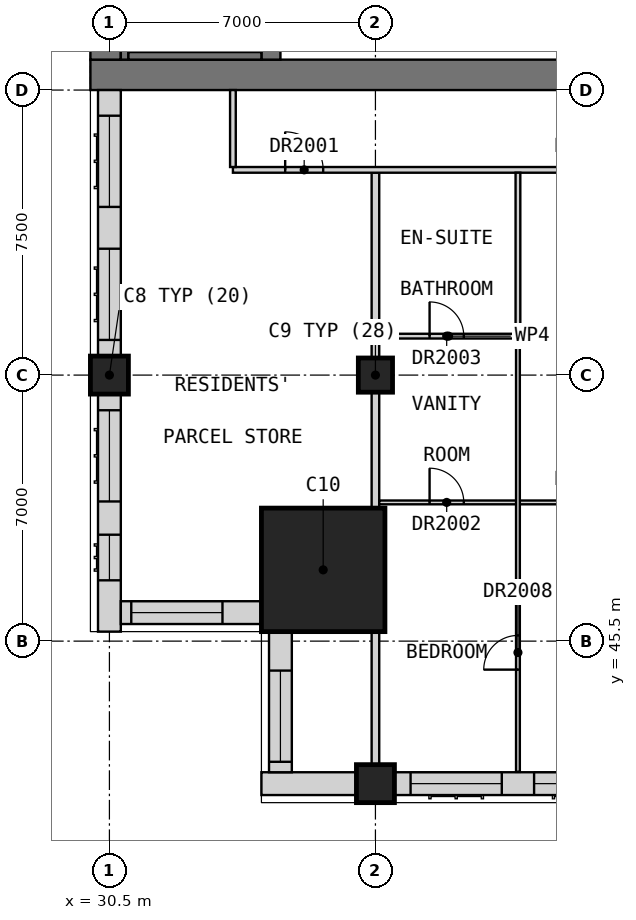
"""IFC4 building model, lengths in metres.
Left out: names, types, materials, properties, quantities, classifications, styles, units other than length and angle.
Written with IfcOpenShell. Run it as: python <this file> out.ifc"""

import sys

from ifc_helpers import new_model, si_unit, direction, frame, frame_2d, origin, origin_2d, place, context, subcontext, project, spatial, rectangle, extrude, element, fill, save


model = new_model("IFC4")
c1 = context("Model", 3, precision=1e-05, world=origin(), true_north=direction((0.0, 1.0)))
c2 = subcontext(c1, "Body", "Model", "MODEL_VIEW")
j1 = project(units=[si_unit("LENGTHUNIT", "METRE"), si_unit("PLANEANGLEUNIT", "RADIAN")], contexts=[c1])
p1 = place(None, origin())
s1 = spatial("IfcSite", under=j1, at=p1, CompositionType="ELEMENT")
p2 = place(p1, origin())
s2 = spatial("IfcBuilding", under=s1, at=p2, CompositionType="ELEMENT")
p3 = place(p2, frame((0.0, 0.0, 182.7)))
s3 = spatial("IfcBuildingStorey", under=s2, at=p3, CompositionType="ELEMENT", Elevation=182.7)
for number, where, z_axis, x_axis in (
    (1, (37.5, 41.75, 0.0), (0.0, 0.0, 1.0), (1.0, 0.0, 0.0)),
    (2, (30.5, 52.5, 0.0), (0.0, 0.0, 1.0), (1.0, 0.0, 0.0)),
):
    element("IfcColumn", number, at=place(p3, frame(where, z_axis=z_axis, x_axis=x_axis)), inside=s3, PredefinedType="COLUMN", context=c2, shape_type="SweptSolid", body=[
        extrude(rectangle(XDim=1.0, YDim=1.0, at=origin_2d()), origin(), (0.0, 0.0, 1.0), 3.5),
    ])
p4 = place(p3, frame((37.5, 52.5, 0.0), z_axis=(0.0, 0.0, 1.0), x_axis=(1.0, 0.0, 0.0)))
e3 = element("IfcColumn", 3, at=p4, inside=s3, PredefinedType="COLUMN", context=c2, shape_type="SweptSolid", body=[
    extrude(rectangle(XDim=0.9, YDim=0.9, at=origin_2d()), origin(), (0.0, 0.0, 1.0), 3.5),
])
p5 = place(p3, frame((36.125, 47.375, 0.0), z_axis=(0.0, 0.0, 1.0), x_axis=(1.0, 0.0, 0.0)))
e4 = element("IfcColumn", 4, at=p5, inside=s3, PredefinedType="COLUMN", context=c2, shape_type="SweptSolid", body=[
    extrude(rectangle(XDim=3.25, YDim=3.25, at=origin_2d()), origin(), (0.0, 0.0, 1.0), 3.5),
])
p6 = place(p3, frame((30.0, 60.4, 0.0), z_axis=(0.0, 0.0, 1.0), x_axis=(1.0, 0.0, 0.0)))
e5 = element("IfcWall", 5, at=p6, inside=s3, PredefinedType="SHEAR", context=c2, shape_type="SweptSolid", body=[
    extrude(rectangle(XDim=30.0, YDim=0.8, at=frame_2d((15.0, 0.0))), origin(), (0.0, 0.0, 1.0), 3.5),
])
p7 = place(p6, frame((21.9, 0.0, 0.0)))
e6 = element("IfcOpeningElement", 6, at=p7, cuts=e5, PredefinedType="OPENING", context=c2, shape_type="SweptSolid", body=[
    extrude(rectangle(XDim=1.8, YDim=2.1, at=frame_2d((0.9, 1.05))), frame((0.0, 0.41, 0.0), z_axis=(0.0, -1.0, 0.0), x_axis=(1.0, 0.0, 0.0)), (0.0, 0.0, 1.0), 0.82),
])
p8 = place(p6, frame((26.5, 0.0, 0.0)))
e7 = element("IfcOpeningElement", 7, at=p8, cuts=e5, PredefinedType="OPENING", context=c2, shape_type="SweptSolid", body=[
    extrude(rectangle(XDim=1.2, YDim=2.1, at=frame_2d((0.6, 1.05))), frame((0.0, 0.41, 0.0), z_axis=(0.0, -1.0, 0.0), x_axis=(1.0, 0.0, 0.0)), (0.0, 0.0, 1.0), 0.82),
])
p9 = place(p3, frame((30.4, 60.8, 0.0), z_axis=(0.0, 0.0, 1.0), x_axis=(0.0, 1.0, 0.0)))
e8 = element("IfcWall", 8, at=p9, inside=s3, PredefinedType="SHEAR", context=c2, shape_type="SweptSolid", body=[
    extrude(rectangle(XDim=20.9, YDim=0.8, at=frame_2d((10.45, 0.0))), origin(), (0.0, 0.0, 1.0), 3.5),
])
p10 = place(p3, frame((34.75, 60.8, 0.0), z_axis=(0.0, 0.0, 1.0), x_axis=(0.0, 1.0, 0.0)))
e9 = element("IfcWall", 9, at=p10, inside=s3, PredefinedType="SHEAR", context=c2, shape_type="SweptSolid", body=[
    extrude(rectangle(XDim=3.4, YDim=0.5, at=frame_2d((1.7, 0.0))), origin(), (0.0, 0.0, 1.0), 3.5),
])
p11 = place(p3, frame((34.5, 41.75, 0.0), z_axis=(0.0, 0.0, 1.0), x_axis=(1.0, 0.0, 0.0)))
e10 = element("IfcWall", 10, at=p11, inside=s3, PredefinedType="SOLIDWALL", context=c2, shape_type="SweptSolid", body=[
    extrude(rectangle(XDim=2.5, YDim=0.6, at=frame_2d((1.25, 0.0))), origin(), (0.0, 0.0, 1.0), 3.25),
])
p12 = place(p3, frame((38.0, 41.75, 0.0), z_axis=(0.0, 0.0, 1.0), x_axis=(1.0, 0.0, 0.0)))
e11 = element("IfcWall", 11, at=p12, inside=s3, PredefinedType="SOLIDWALL", context=c2, shape_type="SweptSolid", body=[
    extrude(rectangle(XDim=6.5, YDim=0.6, at=frame_2d((3.25, 0.0))), origin(), (0.0, 0.0, 1.0), 2.75),
])
p13 = place(p12, frame((0.425, 0.0, 0.8)))
e12 = element("IfcOpeningElement", 12, at=p13, cuts=e11, PredefinedType="OPENING", context=c2, shape_type="SweptSolid", body=[
    extrude(rectangle(XDim=2.4, YDim=1.8, at=frame_2d((1.2, 0.9))), frame((0.0, 0.31, 0.0), z_axis=(0.0, -1.0, 0.0), x_axis=(1.0, 0.0, 0.0)), (0.0, 0.0, 1.0), 0.62),
])
p14 = place(p12, frame((3.675, 0.0, 0.8)))
e13 = element("IfcOpeningElement", 13, at=p14, cuts=e11, PredefinedType="OPENING", context=c2, shape_type="SweptSolid", body=[
    extrude(rectangle(XDim=2.4, YDim=1.8, at=frame_2d((1.2, 0.9))), frame((0.0, 0.31, 0.0), z_axis=(0.0, -1.0, 0.0), x_axis=(1.0, 0.0, 0.0)), (0.0, 0.0, 1.0), 0.62),
])
p15 = place(p3, frame((30.5, 60.0, 0.0), z_axis=(0.0, 0.0, 1.0), x_axis=(0.0, -1.0, 0.0)))
e14 = element("IfcWall", 14, at=p15, inside=s3, PredefinedType="SOLIDWALL", context=c2, shape_type="SweptSolid", body=[
    extrude(rectangle(XDim=7.0, YDim=0.6, at=frame_2d((3.5, 0.0))), origin(), (0.0, 0.0, 1.0), 3.25),
])
p16 = place(p15, frame((4.175, 0.0, 0.8)))
e15 = element("IfcOpeningElement", 15, at=p16, cuts=e14, PredefinedType="OPENING", context=c2, shape_type="SweptSolid", body=[
    extrude(rectangle(XDim=2.4, YDim=1.8, at=frame_2d((1.2, 0.9))), frame((0.0, 0.31, 0.0), z_axis=(0.0, -1.0, 0.0), x_axis=(1.0, 0.0, 0.0)), (0.0, 0.0, 1.0), 0.62),
])
p17 = place(p15, frame((0.675, 0.0, 0.8)))
e16 = element("IfcOpeningElement", 16, at=p17, cuts=e14, PredefinedType="OPENING", context=c2, shape_type="SweptSolid", body=[
    extrude(rectangle(XDim=2.4, YDim=1.8, at=frame_2d((1.2, 0.9))), frame((0.0, 0.31, 0.0), z_axis=(0.0, -1.0, 0.0), x_axis=(1.0, 0.0, 0.0)), (0.0, 0.0, 1.0), 0.62),
])
p18 = place(p3, frame((30.5, 52.0, 0.0), z_axis=(0.0, 0.0, 1.0), x_axis=(0.0, -1.0, 0.0)))
e17 = element("IfcWall", 17, at=p18, inside=s3, PredefinedType="SOLIDWALL", context=c2, shape_type="SweptSolid", body=[
    extrude(rectangle(XDim=6.25, YDim=0.6, at=frame_2d((3.125, 0.0))), origin(), (0.0, 0.0, 1.0), 2.75),
])
p19 = place(p18, frame((3.7, 0.0, 0.8)))
e18 = element("IfcOpeningElement", 18, at=p19, cuts=e17, PredefinedType="OPENING", context=c2, shape_type="SweptSolid", body=[
    extrude(rectangle(XDim=1.2, YDim=1.8, at=frame_2d((0.6, 0.9))), frame((0.0, 0.31, 0.0), z_axis=(0.0, -1.0, 0.0), x_axis=(1.0, 0.0, 0.0)), (0.0, 0.0, 1.0), 0.62),
])
p20 = place(p18, frame((0.425, 0.0, 0.8)))
e19 = element("IfcOpeningElement", 19, at=p20, cuts=e17, PredefinedType="OPENING", context=c2, shape_type="SweptSolid", body=[
    extrude(rectangle(XDim=2.4, YDim=1.8, at=frame_2d((1.2, 0.9))), frame((0.0, 0.31, 0.0), z_axis=(0.0, -1.0, 0.0), x_axis=(1.0, 0.0, 0.0)), (0.0, 0.0, 1.0), 0.62),
])
p21 = place(p3, frame((30.8, 46.25, 0.0), z_axis=(0.0, 0.0, 1.0), x_axis=(1.0, 0.0, 0.0)))
e20 = element("IfcWall", 20, at=p21, inside=s3, PredefinedType="SOLIDWALL", context=c2, shape_type="SweptSolid", body=[
    extrude(rectangle(XDim=3.7, YDim=0.6, at=frame_2d((1.85, 0.0))), origin(), (0.0, 0.0, 1.0), 3.25),
])
p22 = place(p21, frame((0.275, 0.0, 0.8)))
e21 = element("IfcOpeningElement", 21, at=p22, cuts=e20, PredefinedType="OPENING", context=c2, shape_type="SweptSolid", body=[
    extrude(rectangle(XDim=2.4, YDim=1.8, at=frame_2d((1.2, 0.9))), frame((0.0, 0.31, 0.0), z_axis=(0.0, -1.0, 0.0), x_axis=(1.0, 0.0, 0.0)), (0.0, 0.0, 1.0), 0.62),
])
p23 = place(p3, frame((35.0, 45.75, 0.0), z_axis=(0.0, 0.0, 1.0), x_axis=(0.0, -1.0, 0.0)))
e22 = element("IfcWall", 22, at=p23, inside=s3, PredefinedType="SOLIDWALL", context=c2, shape_type="SweptSolid", body=[
    extrude(rectangle(XDim=3.7, YDim=0.6, at=frame_2d((1.85, 0.0))), origin(), (0.0, 0.0, 1.0), 3.25),
])
p24 = place(p23, frame((1.025, 0.0, 0.8)))
e23 = element("IfcOpeningElement", 23, at=p24, cuts=e22, PredefinedType="OPENING", context=c2, shape_type="SweptSolid", body=[
    extrude(rectangle(XDim=2.4, YDim=1.8, at=frame_2d((1.2, 0.9))), frame((0.0, 0.31, 0.0), z_axis=(0.0, -1.0, 0.0), x_axis=(1.0, 0.0, 0.0)), (0.0, 0.0, 1.0), 0.62),
])
p25 = place(p3, frame((30.9, 60.8, 0.0), z_axis=(0.0, 0.0, 1.0), x_axis=(0.0, 1.0, 0.0)))
e24 = element("IfcWall", 24, at=p25, inside=s3, PredefinedType="SOLIDWALL", context=c2, shape_type="SweptSolid", body=[
    extrude(rectangle(XDim=20.9, YDim=0.2, at=frame_2d((10.45, 0.0))), origin(), (0.0, 0.0, 1.0), 3.25),
])
p26 = place(p3, frame((31.0, 60.9, 0.0), z_axis=(0.0, 0.0, 1.0), x_axis=(1.0, 0.0, 0.0)))
e25 = element("IfcWall", 25, at=p26, inside=s3, PredefinedType="SOLIDWALL", context=c2, shape_type="SweptSolid", body=[
    extrude(rectangle(XDim=3.5, YDim=0.2, at=frame_2d((1.75, 0.0))), origin(), (0.0, 0.0, 1.0), 3.25),
])
p27 = place(p3, frame((37.5, 41.25, 0.0), z_axis=(0.0, 0.0, 1.0), x_axis=(0.0, 1.0, 0.0)))
e26 = element("IfcWall", 26, at=p27, inside=s3, PredefinedType="PARTITIONING", context=c2, shape_type="SweptSolid", body=[
    extrude(rectangle(XDim=16.575, YDim=0.2, at=frame_2d((8.288, 0.0))), origin(), (0.0, 0.0, 1.0), 2.75),
])
p28 = place(p3, frame((33.75, 57.9, 0.0), z_axis=(0.0, 0.0, 1.0), x_axis=(1.0, 0.0, 0.0)))
e27 = element("IfcWall", 27, at=p28, inside=s3, PredefinedType="PARTITIONING", context=c2, shape_type="SweptSolid", body=[
    extrude(rectangle(XDim=28.35, YDim=0.15, at=frame_2d((14.175, 0.0))), origin(), (0.0, 0.0, 1.0), 3.25),
])
p29 = place(p28, frame((1.375, 0.0, 0.0)))
e28 = element("IfcOpeningElement", 28, at=p29, cuts=e27, PredefinedType="OPENING", context=c2, shape_type="SweptSolid", body=[
    extrude(rectangle(XDim=1.0, YDim=2.1, at=frame_2d((0.5, 1.05))), frame((0.0, 0.085, 0.0), z_axis=(0.0, -1.0, 0.0), x_axis=(1.0, 0.0, 0.0)), (0.0, 0.0, 1.0), 0.17),
])
p30 = place(p28, frame((8.925, 0.0, 0.0)))
e29 = element("IfcOpeningElement", 29, at=p30, cuts=e27, PredefinedType="OPENING", context=c2, shape_type="SweptSolid", body=[
    extrude(rectangle(XDim=0.9, YDim=2.1, at=frame_2d((0.45, 1.05))), frame((0.0, 0.085, 0.0), z_axis=(0.0, -1.0, 0.0), x_axis=(1.0, 0.0, 0.0)), (0.0, 0.0, 1.0), 0.17),
])
p31 = place(p28, frame((20.175, 0.0, 0.0)))
e30 = element("IfcOpeningElement", 30, at=p31, cuts=e27, PredefinedType="OPENING", context=c2, shape_type="SweptSolid", body=[
    extrude(rectangle(XDim=0.9, YDim=2.1, at=frame_2d((0.45, 1.05))), frame((0.0, 0.085, 0.0), z_axis=(0.0, -1.0, 0.0), x_axis=(1.0, 0.0, 0.0)), (0.0, 0.0, 1.0), 0.17),
])
p32 = place(p28, frame((26.8, 0.0, 0.0)))
e31 = element("IfcOpeningElement", 31, at=p32, cuts=e27, PredefinedType="OPENING", context=c2, shape_type="SweptSolid", body=[
    extrude(rectangle(XDim=1.0, YDim=2.1, at=frame_2d((0.5, 1.05))), frame((0.0, 0.085, 0.0), z_axis=(0.0, -1.0, 0.0), x_axis=(1.0, 0.0, 0.0)), (0.0, 0.0, 1.0), 0.17),
])
p33 = place(p3, frame((33.75, 57.975, 0.0), z_axis=(0.0, 0.0, 1.0), x_axis=(0.0, 1.0, 0.0)))
e32 = element("IfcWall", 32, at=p33, inside=s3, PredefinedType="PARTITIONING", context=c2, shape_type="SweptSolid", body=[
    extrude(rectangle(XDim=2.025, YDim=0.15, at=frame_2d((1.012, 0.0))), origin(), (0.0, 0.0, 1.0), 3.25),
])
p34 = place(p3, frame((37.6, 49.15, 0.0), z_axis=(0.0, 0.0, 1.0), x_axis=(1.0, 0.0, 0.0)))
e33 = element("IfcWall", 33, at=p34, inside=s3, PredefinedType="PARTITIONING", context=c2, shape_type="SweptSolid", body=[
    extrude(rectangle(XDim=22.3, YDim=0.1, at=frame_2d((11.15, 0.0))), origin(), (0.0, 0.0, 1.0), 3.25),
])
p35 = place(p34, frame((1.325, 0.0, 0.0)))
e34 = element("IfcOpeningElement", 34, at=p35, cuts=e33, PredefinedType="OPENING", context=c2, shape_type="SweptSolid", body=[
    extrude(rectangle(XDim=0.9, YDim=2.1, at=frame_2d((0.45, 1.05))), frame((0.0, 0.06, 0.0), z_axis=(0.0, -1.0, 0.0), x_axis=(1.0, 0.0, 0.0)), (0.0, 0.0, 1.0), 0.12),
])
p36 = place(p34, frame((5.075, 0.0, 0.0)))
e35 = element("IfcOpeningElement", 35, at=p36, cuts=e33, PredefinedType="OPENING", context=c2, shape_type="SweptSolid", body=[
    extrude(rectangle(XDim=0.9, YDim=2.1, at=frame_2d((0.45, 1.05))), frame((0.0, 0.06, 0.0), z_axis=(0.0, -1.0, 0.0), x_axis=(1.0, 0.0, 0.0)), (0.0, 0.0, 1.0), 0.12),
])
p37 = place(p34, frame((12.575, 0.0, 0.0)))
e36 = element("IfcOpeningElement", 36, at=p37, cuts=e33, PredefinedType="OPENING", context=c2, shape_type="SweptSolid", body=[
    extrude(rectangle(XDim=0.9, YDim=2.1, at=frame_2d((0.45, 1.05))), frame((0.0, 0.06, 0.0), z_axis=(0.0, -1.0, 0.0), x_axis=(1.0, 0.0, 0.0)), (0.0, 0.0, 1.0), 0.12),
])
p38 = place(p34, frame((16.325, 0.0, 0.0)))
e37 = element("IfcOpeningElement", 37, at=p38, cuts=e33, PredefinedType="OPENING", context=c2, shape_type="SweptSolid", body=[
    extrude(rectangle(XDim=0.9, YDim=2.1, at=frame_2d((0.45, 1.05))), frame((0.0, 0.06, 0.0), z_axis=(0.0, -1.0, 0.0), x_axis=(1.0, 0.0, 0.0)), (0.0, 0.0, 1.0), 0.12),
])
p39 = place(p3, frame((41.25, 42.06, 0.0), z_axis=(0.0, 0.0, 1.0), x_axis=(0.0, 1.0, 0.0)))
e38 = element("IfcWall", 38, at=p39, inside=s3, PredefinedType="PARTITIONING", context=c2, shape_type="SweptSolid", body=[
    extrude(rectangle(XDim=11.402, YDim=0.1, at=frame_2d((5.701, 0.0))), origin(), (0.0, 0.0, 1.0), 3.25),
])
p40 = place(p39, frame((2.69, 0.0, 0.0)))
e39 = element("IfcOpeningElement", 39, at=p40, cuts=e38, PredefinedType="OPENING", context=c2, shape_type="SweptSolid", body=[
    extrude(rectangle(XDim=0.9, YDim=2.1, at=frame_2d((0.45, 1.05))), frame((0.0, 0.06, 0.0), z_axis=(0.0, -1.0, 0.0), x_axis=(1.0, 0.0, 0.0)), (0.0, 0.0, 1.0), 0.12),
])
p41 = place(p3, frame((37.6, 53.525, 0.0), z_axis=(0.0, 0.0, 1.0), x_axis=(1.0, 0.0, 0.0)))
e40 = element("IfcWall", 40, at=p41, inside=s3, PredefinedType="PARTITIONING", context=c2, shape_type="SweptSolid", body=[
    extrude(rectangle(XDim=3.65, YDim=0.125, at=frame_2d((1.825, 0.0))), origin(), (0.0, 0.0, 1.0), 3.25),
])
p42 = place(p41, frame((1.325, 0.0, 0.0)))
e41 = element("IfcOpeningElement", 41, at=p42, cuts=e40, PredefinedType="OPENING", context=c2, shape_type="SweptSolid", body=[
    extrude(rectangle(XDim=0.9, YDim=2.1, at=frame_2d((0.45, 1.05))), frame((0.0, 0.073, 0.0), z_axis=(0.0, -1.0, 0.0), x_axis=(1.0, 0.0, 0.0)), (0.0, 0.0, 1.0), 0.145),
])
p43 = place(p3, frame((41.25, 53.587, 0.0), z_axis=(0.0, 0.0, 1.0), x_axis=(0.0, 1.0, 0.0)))
e42 = element("IfcWall", 42, at=p43, inside=s3, PredefinedType="PARTITIONING", context=c2, shape_type="SweptSolid", body=[
    extrude(rectangle(XDim=4.238, YDim=0.125, at=frame_2d((2.119, 0.0))), origin(), (0.0, 0.0, 1.0), 3.25),
])
p44 = place(p13, origin())
e43 = element("IfcWindow", 43, at=p44, inside=s3, PartitioningType="SINGLE_PANEL", PredefinedType="WINDOW", context=c2, shape_type="SweptSolid", body=[
    extrude(rectangle(XDim=2.4, YDim=1.8, at=frame_2d((1.2, 0.9))), frame((0.0, -0.07, 0.0), z_axis=(0.0, -1.0, 0.0), x_axis=(1.0, 0.0, 0.0)), (0.0, 0.0, 1.0), 0.06),
])
fill(e12, e43)
p45 = place(p14, origin())
e44 = element("IfcWindow", 44, at=p45, inside=s3, PartitioningType="SINGLE_PANEL", PredefinedType="WINDOW", context=c2, shape_type="SweptSolid", body=[
    extrude(rectangle(XDim=2.4, YDim=1.8, at=frame_2d((1.2, 0.9))), frame((0.0, -0.07, 0.0), z_axis=(0.0, -1.0, 0.0), x_axis=(1.0, 0.0, 0.0)), (0.0, 0.0, 1.0), 0.06),
])
fill(e13, e44)
p46 = place(p16, origin())
e45 = element("IfcWindow", 45, at=p46, inside=s3, PartitioningType="SINGLE_PANEL", PredefinedType="WINDOW", context=c2, shape_type="SweptSolid", body=[
    extrude(rectangle(XDim=2.4, YDim=1.8, at=frame_2d((1.2, 0.9))), frame((0.0, -0.07, 0.0), z_axis=(0.0, -1.0, 0.0), x_axis=(1.0, 0.0, 0.0)), (0.0, 0.0, 1.0), 0.06),
])
fill(e15, e45)
p47 = place(p17, origin())
e46 = element("IfcWindow", 46, at=p47, inside=s3, PartitioningType="SINGLE_PANEL", PredefinedType="WINDOW", context=c2, shape_type="SweptSolid", body=[
    extrude(rectangle(XDim=2.4, YDim=1.8, at=frame_2d((1.2, 0.9))), frame((0.0, -0.07, 0.0), z_axis=(0.0, -1.0, 0.0), x_axis=(1.0, 0.0, 0.0)), (0.0, 0.0, 1.0), 0.06),
])
fill(e16, e46)
p48 = place(p19, origin())
e47 = element("IfcWindow", 47, at=p48, inside=s3, PartitioningType="SINGLE_PANEL", PredefinedType="WINDOW", context=c2, shape_type="SweptSolid", body=[
    extrude(rectangle(XDim=1.2, YDim=1.8, at=frame_2d((0.6, 0.9))), frame((0.0, -0.07, 0.0), z_axis=(0.0, -1.0, 0.0), x_axis=(1.0, 0.0, 0.0)), (0.0, 0.0, 1.0), 0.06),
])
fill(e18, e47)
p49 = place(p20, origin())
e48 = element("IfcWindow", 48, at=p49, inside=s3, PartitioningType="SINGLE_PANEL", PredefinedType="WINDOW", context=c2, shape_type="SweptSolid", body=[
    extrude(rectangle(XDim=2.4, YDim=1.8, at=frame_2d((1.2, 0.9))), frame((0.0, -0.07, 0.0), z_axis=(0.0, -1.0, 0.0), x_axis=(1.0, 0.0, 0.0)), (0.0, 0.0, 1.0), 0.06),
])
fill(e19, e48)
p50 = place(p22, origin())
e49 = element("IfcWindow", 49, at=p50, inside=s3, PartitioningType="SINGLE_PANEL", PredefinedType="WINDOW", context=c2, shape_type="SweptSolid", body=[
    extrude(rectangle(XDim=2.4, YDim=1.8, at=frame_2d((1.2, 0.9))), frame((0.0, -0.07, 0.0), z_axis=(0.0, -1.0, 0.0), x_axis=(1.0, 0.0, 0.0)), (0.0, 0.0, 1.0), 0.06),
])
fill(e21, e49)
p51 = place(p24, origin())
e50 = element("IfcWindow", 50, at=p51, inside=s3, PartitioningType="SINGLE_PANEL", PredefinedType="WINDOW", context=c2, shape_type="SweptSolid", body=[
    extrude(rectangle(XDim=2.4, YDim=1.8, at=frame_2d((1.2, 0.9))), frame((0.0, -0.07, 0.0), z_axis=(0.0, -1.0, 0.0), x_axis=(1.0, 0.0, 0.0)), (0.0, 0.0, 1.0), 0.06),
])
fill(e23, e50)
p52 = place(p29, origin())
e51 = element("IfcDoor", 51, at=p52, inside=s3, OperationType="SINGLE_SWING_RIGHT", PredefinedType="DOOR", context=c2, shape_type="SweptSolid", body=[
    extrude(rectangle(XDim=1.0, YDim=2.1, at=frame_2d((0.5, 1.05))), frame((0.0, 0.025, 0.0), z_axis=(0.0, -1.0, 0.0), x_axis=(1.0, 0.0, 0.0)), (0.0, 0.0, 1.0), 0.05),
])
fill(e28, e51)
p53 = place(p35, origin())
e52 = element("IfcDoor", 52, at=p53, inside=s3, OperationType="SINGLE_SWING_LEFT", PredefinedType="DOOR", context=c2, shape_type="SweptSolid", body=[
    extrude(rectangle(XDim=0.9, YDim=2.1, at=frame_2d((0.45, 1.05))), frame((0.0, 0.025, 0.0), z_axis=(0.0, -1.0, 0.0), x_axis=(1.0, 0.0, 0.0)), (0.0, 0.0, 1.0), 0.05),
])
fill(e34, e52)
p54 = place(p42, origin())
e53 = element("IfcDoor", 53, at=p54, inside=s3, OperationType="SINGLE_SWING_LEFT", PredefinedType="DOOR", context=c2, shape_type="SweptSolid", body=[
    extrude(rectangle(XDim=0.9, YDim=2.1, at=frame_2d((0.45, 1.05))), frame((0.0, 0.025, 0.0), z_axis=(0.0, -1.0, 0.0), x_axis=(1.0, 0.0, 0.0)), (0.0, 0.0, 1.0), 0.05),
])
fill(e41, e53)
p55 = place(p40, origin())
e54 = element("IfcDoor", 54, at=p55, inside=s3, OperationType="SINGLE_SWING_LEFT", PredefinedType="DOOR", context=c2, shape_type="SweptSolid", body=[
    extrude(rectangle(XDim=0.9, YDim=2.1, at=frame_2d((0.45, 1.05))), frame((0.0, 0.025, 0.0), z_axis=(0.0, -1.0, 0.0), x_axis=(1.0, 0.0, 0.0)), (0.0, 0.0, 1.0), 0.05),
])
fill(e39, e54)
save(model, sys.argv[1])
